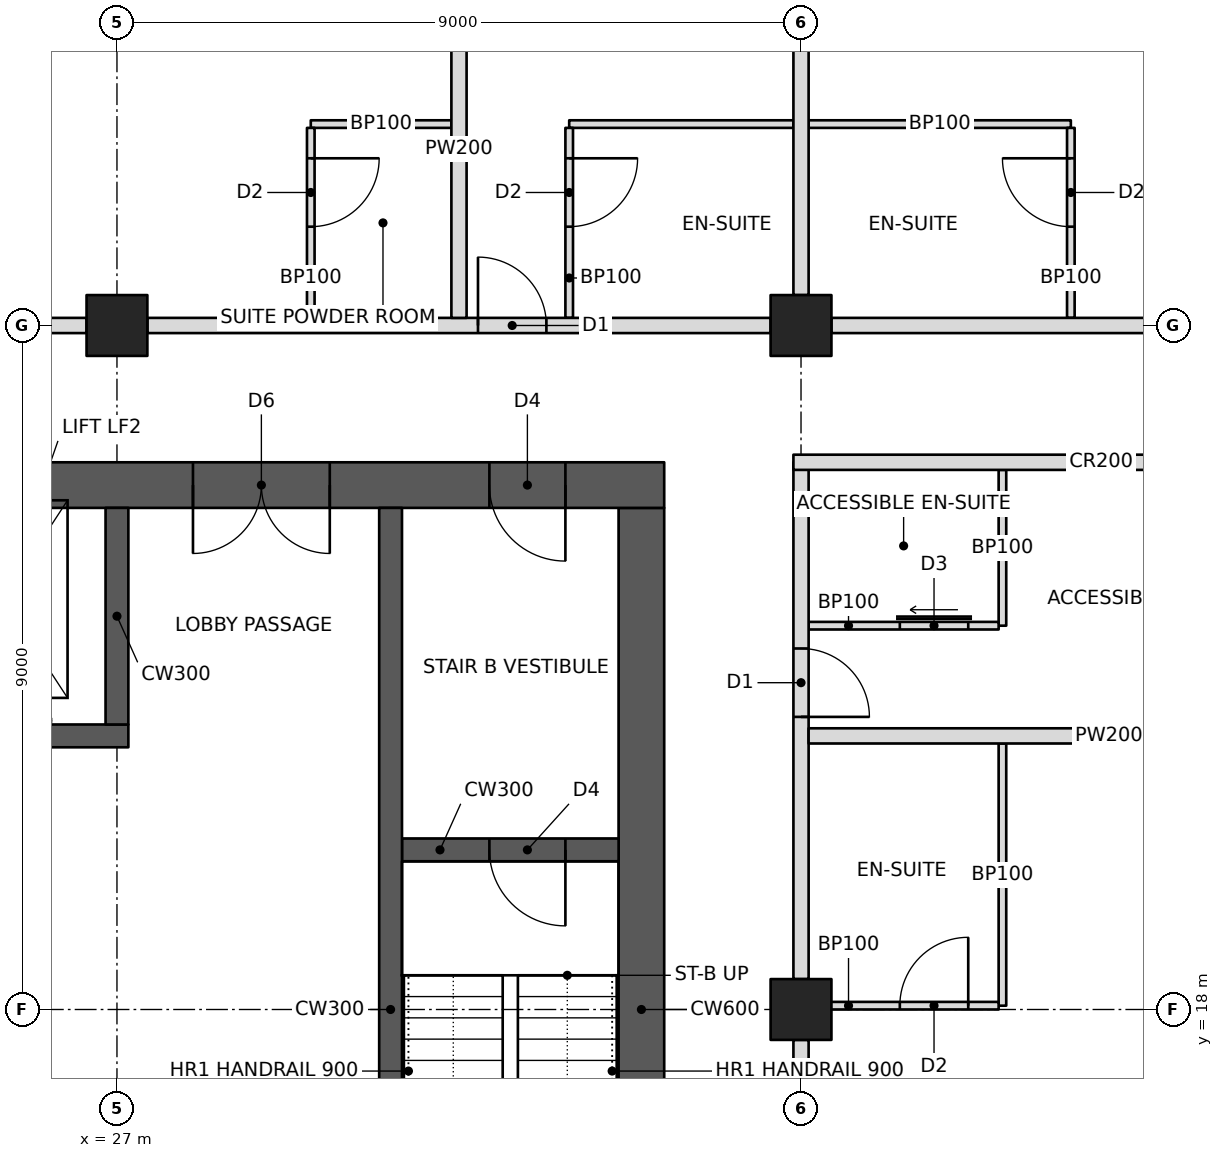
"""IFC4 building model, lengths in metres.
Left out: names, types, materials, properties, quantities, classifications, styles, units other than length and angle.
Written with IfcOpenShell. Run it as: python <this file> out.ifc"""

import sys

from ifc_helpers import new_model, si_unit, direction, frame, frame_2d, origin, origin_2d, place, context, subcontext, project, spatial, rectangle, hollow_rectangle, extrude, element, fill, save


model = new_model("IFC4")
c1 = context("Model", 3, precision=1e-05, world=origin(), true_north=direction((0.0, 1.0)))
c2 = subcontext(c1, "Body", "Model", "MODEL_VIEW")
j1 = project(units=[si_unit("LENGTHUNIT", "METRE"), si_unit("PLANEANGLEUNIT", "RADIAN")], contexts=[c1])
p1 = place(None, origin())
s1 = spatial("IfcSite", under=j1, at=p1, CompositionType="ELEMENT")
p2 = place(p1, origin())
s2 = spatial("IfcBuilding", under=s1, at=p2, CompositionType="ELEMENT")
p3 = place(p2, frame((0.0, 0.0, 148.6)))
s3 = spatial("IfcBuildingStorey", under=s2, at=p3, CompositionType="ELEMENT", Elevation=148.6)
for number, where, z_axis, x_axis in (
    (1, (27.0, 27.0, 0.0), (0.0, 0.0, 1.0), (1.0, 0.0, 0.0)),
    (2, (36.0, 18.0, 0.0), (0.0, 0.0, 1.0), (0.0, 1.0, 0.0)),
    (3, (36.0, 27.0, 0.0), (0.0, 0.0, 1.0), (1.0, 0.0, 0.0)),
):
    element("IfcColumn", number, at=place(p3, frame(where, z_axis=z_axis, x_axis=x_axis)), inside=s3, PredefinedType="COLUMN", context=c2, shape_type="SweptSolid", body=[
        extrude(hollow_rectangle(XDim=0.8, YDim=0.8, WallThickness=0.07, at=origin_2d()), origin(), (0.0, 0.0, 1.0), 3.4),
    ])
p4 = place(p3, frame((10.8, 24.9, 0.0), z_axis=(0.0, 0.0, 1.0), x_axis=(1.0, 0.0, 0.0)))
e4 = element("IfcWall", 4, at=p4, inside=s3, PredefinedType="SHEAR", context=c2, shape_type="SweptSolid", body=[
    extrude(rectangle(XDim=23.4, YDim=0.6, at=frame_2d((11.7, 0.0))), origin(), (0.0, 0.0, 1.0), 3.4),
])
p5 = place(p4, frame((17.2, 0.0, 0.0)))
e5 = element("IfcOpeningElement", 5, at=p5, cuts=e4, PredefinedType="OPENING", context=c2, shape_type="SweptSolid", body=[
    extrude(rectangle(XDim=1.8, YDim=2.1, at=frame_2d((0.9, 1.05))), frame((0.0, 0.31, 0.0), z_axis=(0.0, -1.0, 0.0), x_axis=(1.0, 0.0, 0.0)), (0.0, 0.0, 1.0), 0.62),
])
p6 = place(p4, frame((21.1, 0.0, 0.0)))
e6 = element("IfcOpeningElement", 6, at=p6, cuts=e4, PredefinedType="OPENING", context=c2, shape_type="SweptSolid", body=[
    extrude(rectangle(XDim=1.0, YDim=2.1, at=frame_2d((0.5, 1.05))), frame((0.0, 0.31, 0.0), z_axis=(0.0, -1.0, 0.0), x_axis=(1.0, 0.0, 0.0)), (0.0, 0.0, 1.0), 0.62),
])
p7 = place(p3, frame((33.9, 11.4, 0.0), z_axis=(0.0, 0.0, 1.0), x_axis=(0.0, 1.0, 0.0)))
e7 = element("IfcWall", 7, at=p7, inside=s3, PredefinedType="SHEAR", context=c2, shape_type="SweptSolid", body=[
    extrude(rectangle(XDim=13.2, YDim=0.6, at=frame_2d((6.6, 0.0))), origin(), (0.0, 0.0, 1.0), 3.4),
])
p8 = place(p3, frame((18.15, 21.6, 0.0), z_axis=(0.0, 0.0, 1.0), x_axis=(1.0, 0.0, 0.0)))
e8 = element("IfcWall", 8, at=p8, inside=s3, PredefinedType="SHEAR", context=c2, shape_type="SweptSolid", body=[
    extrude(rectangle(XDim=9.0, YDim=0.3, at=frame_2d((4.5, 0.0))), origin(), (0.0, 0.0, 1.0), 3.4),
])
p9 = place(p8, frame((6.75, 0.0, 0.0)))
e9 = element("IfcOpeningElement", 9, at=p9, cuts=e8, PredefinedType="OPENING", context=c2, shape_type="SweptSolid", body=[
    extrude(rectangle(XDim=1.2, YDim=2.1, at=frame_2d((0.6, 1.05))), frame((0.0, 0.16, 0.0), z_axis=(0.0, -1.0, 0.0), x_axis=(1.0, 0.0, 0.0)), (0.0, 0.0, 1.0), 0.32),
])
p10 = place(p3, frame((27.0, 21.75, 0.0), z_axis=(0.0, 0.0, 1.0), x_axis=(0.0, 1.0, 0.0)))
e10 = element("IfcWall", 10, at=p10, inside=s3, PredefinedType="SHEAR", context=c2, shape_type="SweptSolid", body=[
    extrude(rectangle(XDim=2.85, YDim=0.3, at=frame_2d((1.425, 0.0))), origin(), (0.0, 0.0, 1.0), 3.4),
])
p11 = place(p3, frame((30.6, 11.4, 0.0), z_axis=(0.0, 0.0, 1.0), x_axis=(0.0, 1.0, 0.0)))
e11 = element("IfcWall", 11, at=p11, inside=s3, PredefinedType="SHEAR", context=c2, shape_type="SweptSolid", body=[
    extrude(rectangle(XDim=13.2, YDim=0.3, at=frame_2d((6.6, 0.0))), origin(), (0.0, 0.0, 1.0), 3.4),
])
p12 = place(p3, frame((30.75, 20.1, 0.0), z_axis=(0.0, 0.0, 1.0), x_axis=(1.0, 0.0, 0.0)))
e12 = element("IfcWall", 12, at=p12, inside=s3, PredefinedType="SHEAR", context=c2, shape_type="SweptSolid", body=[
    extrude(rectangle(XDim=2.85, YDim=0.3, at=frame_2d((1.425, 0.0))), origin(), (0.0, 0.0, 1.0), 3.4),
])
p13 = place(p12, frame((1.15, 0.0, 0.0)))
e13 = element("IfcOpeningElement", 13, at=p13, cuts=e12, PredefinedType="OPENING", context=c2, shape_type="SweptSolid", body=[
    extrude(rectangle(XDim=1.0, YDim=2.1, at=frame_2d((0.5, 1.05))), frame((0.0, 0.16, 0.0), z_axis=(0.0, -1.0, 0.0), x_axis=(1.0, 0.0, 0.0)), (0.0, 0.0, 1.0), 0.32),
])
p14 = place(p3, frame((18.4, 27.0, 0.0), z_axis=(0.0, 0.0, 1.0), x_axis=(1.0, 0.0, 0.0)))
e14 = element("IfcWall", 14, at=p14, inside=s3, PredefinedType="PARTITIONING", context=c2, shape_type="SweptSolid", body=[
    extrude(rectangle(XDim=8.2, YDim=0.2, at=frame_2d((4.1, 0.0))), origin(), (0.0, 0.0, 1.0), 2.405),
])
p15 = place(p14, frame((2.95, 0.0, 0.0)))
e15 = element("IfcOpeningElement", 15, at=p15, cuts=e14, PredefinedType="OPENING", context=c2, shape_type="SweptSolid", body=[
    extrude(rectangle(XDim=0.9, YDim=2.1, at=frame_2d((0.45, 1.05))), frame((0.0, 0.11, 0.0), z_axis=(0.0, -1.0, 0.0), x_axis=(1.0, 0.0, 0.0)), (0.0, 0.0, 1.0), 0.22),
])
p16 = place(p14, frame((4.35, 0.0, 0.0)))
e16 = element("IfcOpeningElement", 16, at=p16, cuts=e14, PredefinedType="OPENING", context=c2, shape_type="SweptSolid", body=[
    extrude(rectangle(XDim=0.9, YDim=2.1, at=frame_2d((0.45, 1.05))), frame((0.0, 0.11, 0.0), z_axis=(0.0, -1.0, 0.0), x_axis=(1.0, 0.0, 0.0)), (0.0, 0.0, 1.0), 0.22),
])
p17 = place(p3, frame((27.4, 27.0, 0.0), z_axis=(0.0, 0.0, 1.0), x_axis=(1.0, 0.0, 0.0)))
e17 = element("IfcWall", 17, at=p17, inside=s3, PredefinedType="PARTITIONING", context=c2, shape_type="SweptSolid", body=[
    extrude(rectangle(XDim=8.2, YDim=0.2, at=frame_2d((4.1, 0.0))), origin(), (0.0, 0.0, 1.0), 2.405),
])
p18 = place(p17, frame((4.35, 0.0, 0.0)))
e18 = element("IfcOpeningElement", 18, at=p18, cuts=e17, PredefinedType="OPENING", context=c2, shape_type="SweptSolid", body=[
    extrude(rectangle(XDim=0.9, YDim=2.1, at=frame_2d((0.45, 1.05))), frame((0.0, 0.11, 0.0), z_axis=(0.0, -1.0, 0.0), x_axis=(1.0, 0.0, 0.0)), (0.0, 0.0, 1.0), 0.22),
])
p19 = place(p3, frame((36.4, 27.0, 0.0), z_axis=(0.0, 0.0, 1.0), x_axis=(1.0, 0.0, 0.0)))
e19 = element("IfcWall", 19, at=p19, inside=s3, PredefinedType="PARTITIONING", context=c2, shape_type="SweptSolid", body=[
    extrude(rectangle(XDim=7.6, YDim=0.2, at=frame_2d((3.8, 0.0))), origin(), (0.0, 0.0, 1.0), 2.438),
])
p20 = place(p19, frame((6.45, 0.0, 0.0)))
e20 = element("IfcOpeningElement", 20, at=p20, cuts=e19, PredefinedType="OPENING", context=c2, shape_type="SweptSolid", body=[
    extrude(rectangle(XDim=0.9, YDim=2.1, at=frame_2d((0.45, 1.05))), frame((0.0, 0.11, 0.0), z_axis=(0.0, -1.0, 0.0), x_axis=(1.0, 0.0, 0.0)), (0.0, 0.0, 1.0), 0.22),
])
p21 = place(p3, frame((36.0, 10.8, 0.0), z_axis=(0.0, 0.0, 1.0), x_axis=(0.0, 1.0, 0.0)))
e21 = element("IfcWall", 21, at=p21, inside=s3, PredefinedType="PARTITIONING", context=c2, shape_type="SweptSolid", body=[
    extrude(rectangle(XDim=6.8, YDim=0.2, at=frame_2d((3.4, 0.0))), origin(), (0.0, 0.0, 1.0), 2.405),
])
p22 = place(p21, frame((0.25, 0.0, 0.0)))
e22 = element("IfcOpeningElement", 22, at=p22, cuts=e21, PredefinedType="OPENING", context=c2, shape_type="SweptSolid", body=[
    extrude(rectangle(XDim=0.9, YDim=2.1, at=frame_2d((0.45, 1.05))), frame((0.0, 0.11, 0.0), z_axis=(0.0, -1.0, 0.0), x_axis=(1.0, 0.0, 0.0)), (0.0, 0.0, 1.0), 0.22),
])
p23 = place(p3, frame((36.0, 18.4, 0.0), z_axis=(0.0, 0.0, 1.0), x_axis=(0.0, 1.0, 0.0)))
e23 = element("IfcWall", 23, at=p23, inside=s3, PredefinedType="PARTITIONING", context=c2, shape_type="SweptSolid", body=[
    extrude(rectangle(XDim=6.8, YDim=0.2, at=frame_2d((3.4, 0.0))), origin(), (0.0, 0.0, 1.0), 2.405),
])
p24 = place(p23, frame((3.45, 0.0, 0.0)))
e24 = element("IfcOpeningElement", 24, at=p24, cuts=e23, PredefinedType="OPENING", context=c2, shape_type="SweptSolid", body=[
    extrude(rectangle(XDim=0.9, YDim=2.1, at=frame_2d((0.45, 1.05))), frame((0.0, 0.11, 0.0), z_axis=(0.0, -1.0, 0.0), x_axis=(1.0, 0.0, 0.0)), (0.0, 0.0, 1.0), 0.22),
])
p25 = place(p3, frame((35.9, 25.2, 0.0), z_axis=(0.0, 0.0, 1.0), x_axis=(1.0, 0.0, 0.0)))
e25 = element("IfcWall", 25, at=p25, inside=s3, PredefinedType="PARTITIONING", context=c2, shape_type="SweptSolid", body=[
    extrude(rectangle(XDim=8.1, YDim=0.2, at=frame_2d((4.05, 0.0))), origin(), (0.0, 0.0, 1.0), 2.404),
])
p26 = place(p3, frame((31.5, 27.1, 0.0), z_axis=(0.0, 0.0, 1.0), x_axis=(0.0, 1.0, 0.0)))
e26 = element("IfcWall", 26, at=p26, inside=s3, PredefinedType="PARTITIONING", context=c2, shape_type="SweptSolid", body=[
    extrude(rectangle(XDim=7.9, YDim=0.2, at=frame_2d((3.95, 0.0))), origin(), (0.0, 0.0, 1.0), 2.404),
])
p27 = place(p26, frame((4.6, 0.0, 0.0)))
e27 = element("IfcOpeningElement", 27, at=p27, cuts=e26, PredefinedType="OPENING", context=c2, shape_type="SweptSolid", body=[
    extrude(rectangle(XDim=1.0, YDim=2.1, at=frame_2d((0.5, 1.05))), frame((0.0, 0.11, 0.0), z_axis=(0.0, -1.0, 0.0), x_axis=(1.0, 0.0, 0.0)), (0.0, 0.0, 1.0), 0.22),
])
p28 = place(p3, frame((36.0, 27.4, 0.0), z_axis=(0.0, 0.0, 1.0), x_axis=(0.0, 1.0, 0.0)))
e28 = element("IfcWall", 28, at=p28, inside=s3, PredefinedType="PARTITIONING", context=c2, shape_type="SweptSolid", body=[
    extrude(rectangle(XDim=7.6, YDim=0.2, at=frame_2d((3.8, 0.0))), origin(), (0.0, 0.0, 1.0), 2.438),
])
p29 = place(p3, frame((29.55, 29.65, 0.0), z_axis=(0.0, 0.0, 1.0), x_axis=(1.0, 0.0, 0.0)))
e29 = element("IfcWall", 29, at=p29, inside=s3, PredefinedType="PARTITIONING", context=c2, shape_type="SweptSolid", body=[
    extrude(rectangle(XDim=1.85, YDim=0.1, at=frame_2d((0.925, 0.0))), origin(), (0.0, 0.0, 1.0), 3.2),
])
p30 = place(p3, frame((29.55, 27.1, 0.0), z_axis=(0.0, 0.0, 1.0), x_axis=(0.0, 1.0, 0.0)))
e30 = element("IfcWall", 30, at=p30, inside=s3, PredefinedType="PARTITIONING", context=c2, shape_type="SweptSolid", body=[
    extrude(rectangle(XDim=2.5, YDim=0.1, at=frame_2d((1.25, 0.0))), origin(), (0.0, 0.0, 1.0), 2.404),
])
p31 = place(p30, frame((1.2, 0.0, 0.0)))
e31 = element("IfcOpeningElement", 31, at=p31, cuts=e30, PredefinedType="OPENING", context=c2, shape_type="SweptSolid", body=[
    extrude(rectangle(XDim=0.9, YDim=2.1, at=frame_2d((0.45, 1.05))), frame((0.0, 0.06, 0.0), z_axis=(0.0, -1.0, 0.0), x_axis=(1.0, 0.0, 0.0)), (0.0, 0.0, 1.0), 0.12),
])
p32 = place(p3, frame((32.95, 29.65, 0.0), z_axis=(0.0, 0.0, 1.0), x_axis=(1.0, 0.0, 0.0)))
e32 = element("IfcWall", 32, at=p32, inside=s3, PredefinedType="PARTITIONING", context=c2, shape_type="SweptSolid", body=[
    extrude(rectangle(XDim=2.95, YDim=0.1, at=frame_2d((1.475, 0.0))), origin(), (0.0, 0.0, 1.0), 2.438),
])
p33 = place(p3, frame((32.95, 27.1, 0.0), z_axis=(0.0, 0.0, 1.0), x_axis=(0.0, 1.0, 0.0)))
e33 = element("IfcWall", 33, at=p33, inside=s3, PredefinedType="PARTITIONING", context=c2, shape_type="SweptSolid", body=[
    extrude(rectangle(XDim=2.5, YDim=0.1, at=frame_2d((1.25, 0.0))), origin(), (0.0, 0.0, 1.0), 2.404),
])
p34 = place(p33, frame((1.2, 0.0, 0.0)))
e34 = element("IfcOpeningElement", 34, at=p34, cuts=e33, PredefinedType="OPENING", context=c2, shape_type="SweptSolid", body=[
    extrude(rectangle(XDim=0.9, YDim=2.1, at=frame_2d((0.45, 1.05))), frame((0.0, 0.06, 0.0), z_axis=(0.0, -1.0, 0.0), x_axis=(1.0, 0.0, 0.0)), (0.0, 0.0, 1.0), 0.12),
])
p35 = place(p3, frame((36.1, 29.65, 0.0), z_axis=(0.0, 0.0, 1.0), x_axis=(1.0, 0.0, 0.0)))
e35 = element("IfcWall", 35, at=p35, inside=s3, PredefinedType="PARTITIONING", context=c2, shape_type="SweptSolid", body=[
    extrude(rectangle(XDim=3.45, YDim=0.1, at=frame_2d((1.725, 0.0))), origin(), (0.0, 0.0, 1.0), 2.438),
])
p36 = place(p3, frame((39.55, 27.1, 0.0), z_axis=(0.0, 0.0, 1.0), x_axis=(0.0, 1.0, 0.0)))
e36 = element("IfcWall", 36, at=p36, inside=s3, PredefinedType="PARTITIONING", context=c2, shape_type="SweptSolid", body=[
    extrude(rectangle(XDim=2.5, YDim=0.1, at=frame_2d((1.25, 0.0))), origin(), (0.0, 0.0, 1.0), 2.438),
])
p37 = place(p36, frame((1.2, 0.0, 0.0)))
e37 = element("IfcOpeningElement", 37, at=p37, cuts=e36, PredefinedType="OPENING", context=c2, shape_type="SweptSolid", body=[
    extrude(rectangle(XDim=0.9, YDim=2.1, at=frame_2d((0.45, 1.05))), frame((0.0, 0.06, 0.0), z_axis=(0.0, -1.0, 0.0), x_axis=(1.0, 0.0, 0.0)), (0.0, 0.0, 1.0), 0.12),
])
p38 = place(p3, frame((36.1, 21.6, 0.0), z_axis=(0.0, 0.0, 1.0), x_axis=(1.0, 0.0, 0.0)))
e38 = element("IfcWall", 38, at=p38, inside=s3, PredefinedType="PARTITIONING", context=c2, shape_type="SweptSolid", body=[
    extrude(rectangle(XDim=7.9, YDim=0.2, at=frame_2d((3.95, 0.0))), origin(), (0.0, 0.0, 1.0), 2.404),
])
p39 = place(p3, frame((38.65, 18.05, 0.0), z_axis=(0.0, 0.0, 1.0), x_axis=(0.0, 1.0, 0.0)))
e39 = element("IfcWall", 39, at=p39, inside=s3, PredefinedType="PARTITIONING", context=c2, shape_type="SweptSolid", body=[
    extrude(rectangle(XDim=3.45, YDim=0.1, at=frame_2d((1.725, 0.0))), origin(), (0.0, 0.0, 1.0), 2.404),
])
p40 = place(p3, frame((36.1, 18.05, 0.0), z_axis=(0.0, 0.0, 1.0), x_axis=(1.0, 0.0, 0.0)))
e40 = element("IfcWall", 40, at=p40, inside=s3, PredefinedType="PARTITIONING", context=c2, shape_type="SweptSolid", body=[
    extrude(rectangle(XDim=2.5, YDim=0.1, at=frame_2d((1.25, 0.0))), origin(), (0.0, 0.0, 1.0), 2.405),
])
p41 = place(p40, frame((1.2, 0.0, 0.0)))
e41 = element("IfcOpeningElement", 41, at=p41, cuts=e40, PredefinedType="OPENING", context=c2, shape_type="SweptSolid", body=[
    extrude(rectangle(XDim=0.9, YDim=2.1, at=frame_2d((0.45, 1.05))), frame((0.0, 0.06, 0.0), z_axis=(0.0, -1.0, 0.0), x_axis=(1.0, 0.0, 0.0)), (0.0, 0.0, 1.0), 0.12),
])
p42 = place(p3, frame((38.65, 23.05, 0.0), z_axis=(0.0, 0.0, 1.0), x_axis=(0.0, 1.0, 0.0)))
e42 = element("IfcWall", 42, at=p42, inside=s3, PredefinedType="PARTITIONING", context=c2, shape_type="SweptSolid", body=[
    extrude(rectangle(XDim=2.05, YDim=0.1, at=frame_2d((1.025, 0.0))), origin(), (0.0, 0.0, 1.0), 3.2),
])
p43 = place(p3, frame((36.1, 23.05, 0.0), z_axis=(0.0, 0.0, 1.0), x_axis=(1.0, 0.0, 0.0)))
e43 = element("IfcWall", 43, at=p43, inside=s3, PredefinedType="PARTITIONING", context=c2, shape_type="SweptSolid", body=[
    extrude(rectangle(XDim=2.5, YDim=0.1, at=frame_2d((1.25, 0.0))), origin(), (0.0, 0.0, 1.0), 2.404),
])
p44 = place(p43, frame((1.2, 0.0, 0.0)))
e44 = element("IfcOpeningElement", 44, at=p44, cuts=e43, PredefinedType="OPENING", context=c2, shape_type="SweptSolid", body=[
    extrude(rectangle(XDim=0.9, YDim=2.1, at=frame_2d((0.45, 1.05))), frame((0.0, 0.06, 0.0), z_axis=(0.0, -1.0, 0.0), x_axis=(1.0, 0.0, 0.0)), (0.0, 0.0, 1.0), 0.12),
])
p45 = place(p31, frame((0.9, 0.0, 0.0), z_axis=(0.0, 0.0, 1.0), x_axis=(-1.0, 0.0, 0.0)))
e45 = element("IfcDoor", 45, at=p45, inside=s3, OperationType="SINGLE_SWING_LEFT", PredefinedType="DOOR", context=c2, shape_type="SweptSolid", body=[
    extrude(rectangle(XDim=0.9, YDim=2.1, at=frame_2d((0.45, 1.05))), frame((0.0, 0.025, 0.0), z_axis=(0.0, -1.0, 0.0), x_axis=(1.0, 0.0, 0.0)), (0.0, 0.0, 1.0), 0.05),
])
fill(e31, e45)
p46 = place(p34, frame((0.9, 0.0, 0.0), z_axis=(0.0, 0.0, 1.0), x_axis=(-1.0, 0.0, 0.0)))
e46 = element("IfcDoor", 46, at=p46, inside=s3, OperationType="SINGLE_SWING_LEFT", PredefinedType="DOOR", context=c2, shape_type="SweptSolid", body=[
    extrude(rectangle(XDim=0.9, YDim=2.1, at=frame_2d((0.45, 1.05))), frame((0.0, 0.025, 0.0), z_axis=(0.0, -1.0, 0.0), x_axis=(1.0, 0.0, 0.0)), (0.0, 0.0, 1.0), 0.05),
])
fill(e34, e46)
p47 = place(p18, origin())
e47 = element("IfcDoor", 47, at=p47, inside=s3, OperationType="SINGLE_SWING_LEFT", PredefinedType="DOOR", context=c2, shape_type="SweptSolid", body=[
    extrude(rectangle(XDim=0.9, YDim=2.1, at=frame_2d((0.45, 1.05))), frame((0.0, 0.025, 0.0), z_axis=(0.0, -1.0, 0.0), x_axis=(1.0, 0.0, 0.0)), (0.0, 0.0, 1.0), 0.05),
])
fill(e18, e47)
p48 = place(p37, origin())
e48 = element("IfcDoor", 48, at=p48, inside=s3, OperationType="SINGLE_SWING_RIGHT", PredefinedType="DOOR", context=c2, shape_type="SweptSolid", body=[
    extrude(rectangle(XDim=0.9, YDim=2.1, at=frame_2d((0.45, 1.05))), frame((0.0, 0.025, 0.0), z_axis=(0.0, -1.0, 0.0), x_axis=(1.0, 0.0, 0.0)), (0.0, 0.0, 1.0), 0.05),
])
fill(e37, e48)
p49 = place(p41, origin())
e49 = element("IfcDoor", 49, at=p49, inside=s3, OperationType="SINGLE_SWING_RIGHT", PredefinedType="DOOR", context=c2, shape_type="SweptSolid", body=[
    extrude(rectangle(XDim=0.9, YDim=2.1, at=frame_2d((0.45, 1.05))), frame((0.0, 0.025, 0.0), z_axis=(0.0, -1.0, 0.0), x_axis=(1.0, 0.0, 0.0)), (0.0, 0.0, 1.0), 0.05),
])
fill(e41, e49)
p50 = place(p44, origin())
e50 = element("IfcDoor", 50, at=p50, inside=s3, OperationType="SLIDING_TO_LEFT", PredefinedType="DOOR", context=c2, shape_type="SweptSolid", body=[
    extrude(rectangle(XDim=0.9, YDim=2.1, at=frame_2d((0.45, 1.05))), frame((0.0, 0.025, 0.0), z_axis=(0.0, -1.0, 0.0), x_axis=(1.0, 0.0, 0.0)), (0.0, 0.0, 1.0), 0.05),
])
fill(e44, e50)
p51 = place(p24, frame((0.9, 0.0, 0.0), z_axis=(0.0, 0.0, 1.0), x_axis=(-1.0, 0.0, 0.0)))
e51 = element("IfcDoor", 51, at=p51, inside=s3, OperationType="SINGLE_SWING_RIGHT", PredefinedType="DOOR", context=c2, shape_type="SweptSolid", body=[
    extrude(rectangle(XDim=0.9, YDim=2.1, at=frame_2d((0.45, 1.05))), frame((0.0, 0.025, 0.0), z_axis=(0.0, -1.0, 0.0), x_axis=(1.0, 0.0, 0.0)), (0.0, 0.0, 1.0), 0.05),
])
fill(e24, e51)
p52 = place(p5, frame((1.8, 0.0, 0.0), z_axis=(0.0, 0.0, 1.0), x_axis=(-1.0, 0.0, 0.0)))
e52 = element("IfcDoor", 52, at=p52, inside=s3, OperationType="DOUBLE_DOOR_SINGLE_SWING", PredefinedType="DOOR", context=c2, shape_type="SweptSolid", body=[
    extrude(rectangle(XDim=1.8, YDim=2.1, at=frame_2d((0.9, 1.05))), frame((0.0, 0.025, 0.0), z_axis=(0.0, -1.0, 0.0), x_axis=(1.0, 0.0, 0.0)), (0.0, 0.0, 1.0), 0.05),
])
fill(e5, e52)
p53 = place(p6, frame((1.0, 0.0, 0.0), z_axis=(0.0, 0.0, 1.0), x_axis=(-1.0, 0.0, 0.0)))
e53 = element("IfcDoor", 53, at=p53, inside=s3, OperationType="SINGLE_SWING_LEFT", PredefinedType="DOOR", context=c2, shape_type="SweptSolid", body=[
    extrude(rectangle(XDim=1.0, YDim=2.1, at=frame_2d((0.5, 1.05))), frame((0.0, 0.025, 0.0), z_axis=(0.0, -1.0, 0.0), x_axis=(1.0, 0.0, 0.0)), (0.0, 0.0, 1.0), 0.05),
])
fill(e6, e53)
p54 = place(p13, frame((1.0, 0.0, 0.0), z_axis=(0.0, 0.0, 1.0), x_axis=(-1.0, 0.0, 0.0)))
e54 = element("IfcDoor", 54, at=p54, inside=s3, OperationType="SINGLE_SWING_LEFT", PredefinedType="DOOR", context=c2, shape_type="SweptSolid", body=[
    extrude(rectangle(XDim=1.0, YDim=2.1, at=frame_2d((0.5, 1.05))), frame((0.0, 0.025, 0.0), z_axis=(0.0, -1.0, 0.0), x_axis=(1.0, 0.0, 0.0)), (0.0, 0.0, 1.0), 0.05),
])
fill(e13, e54)
save(model, sys.argv[1])
